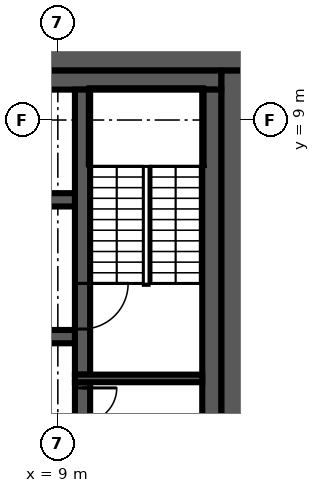
"""IFC4 building model, lengths in metres.
Left out: names, types, materials, properties, quantities, classifications, styles, units other than length and angle.
Written with IfcOpenShell. Run it as: python <this file> out.ifc"""

import sys

from ifc_helpers import new_model, si_unit, direction, frame, frame_2d, origin, place, context, subcontext, project, spatial, rectangle, extrude, element, fill, save


model = new_model("IFC4")
c1 = context("Model", 3, precision=1e-05, world=origin(), true_north=direction((0.0, 1.0)))
c2 = subcontext(c1, "Body", "Model", "MODEL_VIEW")
j1 = project(units=[si_unit("LENGTHUNIT", "METRE"), si_unit("PLANEANGLEUNIT", "RADIAN")], contexts=[c1])
p1 = place(None, origin())
s1 = spatial("IfcSite", under=j1, at=p1, CompositionType="ELEMENT")
p2 = place(p1, origin())
s2 = spatial("IfcBuilding", under=s1, at=p2, CompositionType="ELEMENT")
p3 = place(p2, frame((0.0, 0.0, 253.8)))
s3 = spatial("IfcBuildingStorey", under=s2, at=p3, CompositionType="ELEMENT", Elevation=253.8)
p4 = place(p3, frame((-14.0, 10.65, 0.0), z_axis=(0.0, 0.0, 1.0), x_axis=(1.0, 0.0, 0.0)))
e1 = element("IfcWall", 1, at=p4, inside=s3, PredefinedType="SHEAR", context=c2, shape_type="SweptSolid", body=[
    extrude(rectangle(XDim=28.0, YDim=0.7, at=frame_2d((14.0, 0.0))), origin(), (0.0, 0.0, 1.0), 3.82),
])
p5 = place(p4, frame((15.9, 0.0, 0.0)))
e2 = element("IfcOpeningElement", 2, at=p5, cuts=e1, PredefinedType="OPENING", context=c2, shape_type="SweptSolid", body=[
    extrude(rectangle(XDim=1.6, YDim=2.1, at=frame_2d((0.8, 1.05))), frame((0.0, 0.36, 0.0), z_axis=(0.0, -1.0, 0.0), x_axis=(1.0, 0.0, 0.0)), (0.0, 0.0, 1.0), 0.72),
])
p6 = place(p3, frame((13.65, 10.3, 0.0), z_axis=(0.0, 0.0, 1.0), x_axis=(0.0, -1.0, 0.0)))
e3 = element("IfcWall", 3, at=p6, inside=s3, PredefinedType="SHEAR", context=c2, shape_type="SweptSolid", body=[
    extrude(rectangle(XDim=20.6, YDim=0.7, at=frame_2d((10.3, 0.0))), origin(), (0.0, 0.0, 1.0), 3.82),
])
p7 = place(p3, frame((3.9, 10.05, 0.0), z_axis=(0.0, 0.0, 1.0), x_axis=(1.0, 0.0, 0.0)))
e4 = element("IfcWall", 4, at=p7, inside=s3, PredefinedType="SHEAR", context=c2, shape_type="SweptSolid", body=[
    extrude(rectangle(XDim=9.4, YDim=0.5, at=frame_2d((4.7, 0.0))), origin(), (0.0, 0.0, 1.0), 3.82),
])
p8 = place(p3, frame((13.05, 9.8, 0.0), z_axis=(0.0, 0.0, 1.0), x_axis=(0.0, -1.0, 0.0)))
e5 = element("IfcWall", 5, at=p8, inside=s3, PredefinedType="SHEAR", context=c2, shape_type="SweptSolid", body=[
    extrude(rectangle(XDim=19.6, YDim=0.5, at=frame_2d((9.8, 0.0))), origin(), (0.0, 0.0, 1.0), 3.82),
])
p9 = place(p3, frame((9.65, 2.1, 0.0), z_axis=(0.0, 0.0, 1.0), x_axis=(0.0, -1.0, 0.0)))
e6 = element("IfcWall", 6, at=p9, inside=s3, PredefinedType="SHEAR", context=c2, shape_type="SweptSolid", body=[
    extrude(rectangle(XDim=4.2, YDim=0.4, at=frame_2d((2.1, 0.0))), origin(), (0.0, 0.0, 1.0), 3.82),
])
p10 = place(p9, frame((0.15, 0.0, 0.0)))
e7 = element("IfcOpeningElement", 7, at=p10, cuts=e6, PredefinedType="OPENING", context=c2, shape_type="SweptSolid", body=[
    extrude(rectangle(XDim=0.9, YDim=2.1, at=frame_2d((0.45, 1.05))), frame((0.0, 0.21, 0.0), z_axis=(0.0, -1.0, 0.0), x_axis=(1.0, 0.0, 0.0)), (0.0, 0.0, 1.0), 0.42),
])
p11 = place(p3, frame((9.65, 9.8, 0.0), z_axis=(0.0, 0.0, 1.0), x_axis=(0.0, -1.0, 0.0)))
e8 = element("IfcWall", 8, at=p11, inside=s3, PredefinedType="SHEAR", context=c2, shape_type="SweptSolid", body=[
    extrude(rectangle(XDim=7.5, YDim=0.4, at=frame_2d((3.75, 0.0))), origin(), (0.0, 0.0, 1.0), 3.82),
])
p12 = place(p11, frame((5.1, 0.0, 0.0)))
e9 = element("IfcOpeningElement", 9, at=p12, cuts=e8, PredefinedType="OPENING", context=c2, shape_type="SweptSolid", body=[
    extrude(rectangle(XDim=1.2, YDim=2.1, at=frame_2d((0.6, 1.05))), frame((0.0, 0.21, 0.0), z_axis=(0.0, -1.0, 0.0), x_axis=(1.0, 0.0, 0.0)), (0.0, 0.0, 1.0), 0.42),
])
p13 = place(p3, frame((9.45, 2.2, 0.0), z_axis=(0.0, 0.0, 1.0), x_axis=(1.0, 0.0, 0.0)))
e10 = element("IfcWall", 10, at=p13, inside=s3, PredefinedType="SHEAR", context=c2, shape_type="SweptSolid", body=[
    extrude(rectangle(XDim=3.35, YDim=0.2, at=frame_2d((1.675, 0.0))), origin(), (0.0, 0.0, 1.0), 3.82),
])
p14 = place(p3, frame((-9.45, 6.9, 0.0), z_axis=(0.0, 0.0, 1.0), x_axis=(1.0, 0.0, 0.0)))
e11 = element("IfcWall", 11, at=p14, inside=s3, PredefinedType="SHEAR", context=c2, shape_type="SweptSolid", body=[
    extrude(rectangle(XDim=18.9, YDim=0.35, at=frame_2d((9.45, 0.0))), origin(), (0.0, 0.0, 1.0), 3.82),
])
p15 = place(p14, frame((11.55, 0.0, 0.0)))
e12 = element("IfcOpeningElement", 12, at=p15, cuts=e11, PredefinedType="OPENING", context=c2, shape_type="SweptSolid", body=[
    extrude(rectangle(XDim=1.2, YDim=2.1, at=frame_2d((0.6, 1.05))), frame((0.0, 0.185, 0.0), z_axis=(0.0, -1.0, 0.0), x_axis=(1.0, 0.0, 0.0)), (0.0, 0.0, 1.0), 0.37),
])
p16 = place(p14, frame((14.3, 0.0, 0.0)))
e13 = element("IfcOpeningElement", 13, at=p16, cuts=e11, PredefinedType="OPENING", context=c2, shape_type="SweptSolid", body=[
    extrude(rectangle(XDim=1.1, YDim=2.1, at=frame_2d((0.55, 1.05))), frame((0.0, 0.185, 0.0), z_axis=(0.0, -1.0, 0.0), x_axis=(1.0, 0.0, 0.0)), (0.0, 0.0, 1.0), 0.37),
])
p17 = place(p14, frame((17.0, 0.0, 0.0)))
e14 = element("IfcOpeningElement", 14, at=p17, cuts=e11, PredefinedType="OPENING", context=c2, shape_type="SweptSolid", body=[
    extrude(rectangle(XDim=1.1, YDim=2.1, at=frame_2d((0.55, 1.05))), frame((0.0, 0.185, 0.0), z_axis=(0.0, -1.0, 0.0), x_axis=(1.0, 0.0, 0.0)), (0.0, 0.0, 1.0), 0.37),
])
p18 = place(p14, frame((0.9, 0.0, 0.0)))
e15 = element("IfcOpeningElement", 15, at=p18, cuts=e11, PredefinedType="OPENING", context=c2, shape_type="SweptSolid", body=[
    extrude(rectangle(XDim=0.9, YDim=2.1, at=frame_2d((0.45, 1.05))), frame((0.0, 0.185, 0.0), z_axis=(0.0, -1.0, 0.0), x_axis=(1.0, 0.0, 0.0)), (0.0, 0.0, 1.0), 0.37),
])
p19 = place(p14, frame((6.3, 0.0, 0.0)))
e16 = element("IfcOpeningElement", 16, at=p19, cuts=e11, PredefinedType="OPENING", context=c2, shape_type="SweptSolid", body=[
    extrude(rectangle(XDim=0.9, YDim=2.1, at=frame_2d((0.45, 1.05))), frame((0.0, 0.185, 0.0), z_axis=(0.0, -1.0, 0.0), x_axis=(1.0, 0.0, 0.0)), (0.0, 0.0, 1.0), 0.37),
])
p20 = place(p3, frame((9.45, 3.3, 0.0), z_axis=(0.0, 0.0, 1.0), x_axis=(-1.0, 0.0, 0.0)))
e17 = element("IfcWall", 17, at=p20, inside=s3, PredefinedType="SHEAR", context=c2, shape_type="SweptSolid", body=[
    extrude(rectangle(XDim=18.9, YDim=0.35, at=frame_2d((9.45, 0.0))), origin(), (0.0, 0.0, 1.0), 3.82),
])
p21 = place(p20, frame((6.2, 0.0, 0.0)))
e18 = element("IfcOpeningElement", 18, at=p21, cuts=e17, PredefinedType="OPENING", context=c2, shape_type="SweptSolid", body=[
    extrude(rectangle(XDim=1.1, YDim=2.1, at=frame_2d((0.55, 1.05))), frame((0.0, 0.185, 0.0), z_axis=(0.0, -1.0, 0.0), x_axis=(1.0, 0.0, 0.0)), (0.0, 0.0, 1.0), 0.37),
])
p22 = place(p20, frame((3.5, 0.0, 0.0)))
e19 = element("IfcOpeningElement", 19, at=p22, cuts=e17, PredefinedType="OPENING", context=c2, shape_type="SweptSolid", body=[
    extrude(rectangle(XDim=1.1, YDim=2.1, at=frame_2d((0.55, 1.05))), frame((0.0, 0.185, 0.0), z_axis=(0.0, -1.0, 0.0), x_axis=(1.0, 0.0, 0.0)), (0.0, 0.0, 1.0), 0.37),
])
p23 = place(p20, frame((0.9, 0.0, 0.0)))
e20 = element("IfcOpeningElement", 20, at=p23, cuts=e17, PredefinedType="OPENING", context=c2, shape_type="SweptSolid", body=[
    extrude(rectangle(XDim=0.9, YDim=2.1, at=frame_2d((0.45, 1.05))), frame((0.0, 0.185, 0.0), z_axis=(0.0, -1.0, 0.0), x_axis=(1.0, 0.0, 0.0)), (0.0, 0.0, 1.0), 0.37),
])
p24 = place(p20, frame((14.4, 0.0, 0.0)))
e21 = element("IfcOpeningElement", 21, at=p24, cuts=e17, PredefinedType="OPENING", context=c2, shape_type="SweptSolid", body=[
    extrude(rectangle(XDim=0.9, YDim=2.1, at=frame_2d((0.45, 1.05))), frame((0.0, 0.185, 0.0), z_axis=(0.0, -1.0, 0.0), x_axis=(1.0, 0.0, 0.0)), (0.0, 0.0, 1.0), 0.37),
])
p25 = place(p20, frame((9.0, 0.0, 0.0)))
e22 = element("IfcOpeningElement", 22, at=p25, cuts=e17, PredefinedType="OPENING", context=c2, shape_type="SweptSolid", body=[
    extrude(rectangle(XDim=0.9, YDim=2.1, at=frame_2d((0.45, 1.05))), frame((0.0, 0.185, 0.0), z_axis=(0.0, -1.0, 0.0), x_axis=(1.0, 0.0, 0.0)), (0.0, 0.0, 1.0), 0.37),
])
p26 = place(p10, origin())
e23 = element("IfcDoor", 23, at=p26, inside=s3, OperationType="SINGLE_SWING_RIGHT", PredefinedType="DOOR", context=c2, shape_type="SweptSolid", body=[
    extrude(rectangle(XDim=0.9, YDim=2.1, at=frame_2d((0.45, 1.05))), frame((0.0, 0.025, 0.0), z_axis=(0.0, -1.0, 0.0), x_axis=(1.0, 0.0, 0.0)), (0.0, 0.0, 1.0), 0.05),
])
fill(e7, e23)
p27 = place(p12, origin())
e24 = element("IfcDoor", 24, at=p27, inside=s3, OperationType="SINGLE_SWING_LEFT", PredefinedType="DOOR", context=c2, shape_type="SweptSolid", body=[
    extrude(rectangle(XDim=1.2, YDim=2.1, at=frame_2d((0.6, 1.05))), frame((0.0, 0.025, 0.0), z_axis=(0.0, -1.0, 0.0), x_axis=(1.0, 0.0, 0.0)), (0.0, 0.0, 1.0), 0.05),
])
fill(e9, e24)
save(model, sys.argv[1])
